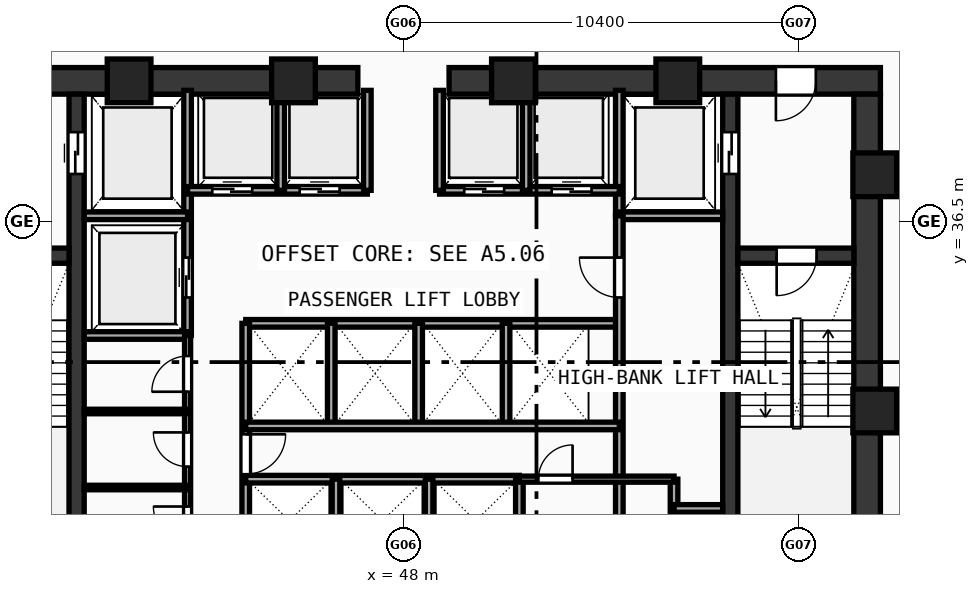
"""IFC4 building model, lengths in metres.
Left out: names, types, materials, properties, quantities, classifications, styles, units other than length and angle.
Written with IfcOpenShell. Run it as: python <this file> out.ifc"""

import sys

from ifc_helpers import new_model, si_unit, direction, frame, frame_2d, origin, origin_with_axes, origin_2d, place, context, subcontext, project, spatial, rectangle, hollow_rectangle, extrude, source, transform, mapped, element, fill, save


model = new_model("IFC4")
c1 = context("Model", 3, precision=1e-05, world=origin(), true_north=direction((0.0, 1.0)))
c2 = subcontext(c1, "Body", "Model", "MODEL_VIEW")
j1 = project(units=[si_unit("LENGTHUNIT", "METRE"), si_unit("PLANEANGLEUNIT", "RADIAN")], contexts=[c1])
p1 = place(None, origin())
s1 = spatial("IfcSite", under=j1, at=p1, CompositionType="ELEMENT")
p2 = place(p1, origin())
s2 = spatial("IfcBuilding", under=s1, at=p2, CompositionType="ELEMENT")
p3 = place(p2, frame((0.0, 0.0, 55.81)))
s3 = spatial("IfcBuildingStorey", under=s2, at=p3, CompositionType="ELEMENT", Elevation=55.81)
p4 = place(p3, frame((35.45, 40.2, 0.0), z_axis=(0.0, 0.0, 1.0), x_axis=(1.0, 0.0, 0.0)))
e1 = element("IfcWall", 1, at=p4, inside=s3, PredefinedType="SHEAR", context=c2, shape_type="SweptSolid", body=[
    extrude(rectangle(XDim=11.35, YDim=0.7, at=frame_2d((5.675, 0.0))), origin(), (0.0, 0.0, 1.0), 3.37),
])
p5 = place(p4, frame((1.7, 0.0, 0.0)))
e2 = element("IfcOpeningElement", 2, at=p5, cuts=e1, PredefinedType="OPENING", context=c2, shape_type="SweptSolid", body=[
    extrude(rectangle(XDim=1.05, YDim=2.1, at=frame_2d((0.525, 1.05))), frame((0.0, 0.36, 0.0), z_axis=(0.0, -1.0, 0.0), x_axis=(1.0, 0.0, 0.0)), (0.0, 0.0, 1.0), 0.72),
])
p6 = place(p3, frame((49.2, 40.2, 0.0), z_axis=(0.0, 0.0, 1.0), x_axis=(1.0, 0.0, 0.0)))
e3 = element("IfcWall", 3, at=p6, inside=s3, PredefinedType="SHEAR", context=c2, shape_type="SweptSolid", body=[
    extrude(rectangle(XDim=11.35, YDim=0.7, at=frame_2d((5.675, 0.0))), origin(), (0.0, 0.0, 1.0), 3.37),
])
p7 = place(p6, frame((8.6, 0.0, 0.0)))
e4 = element("IfcOpeningElement", 4, at=p7, cuts=e3, PredefinedType="OPENING", context=c2, shape_type="SweptSolid", body=[
    extrude(rectangle(XDim=1.05, YDim=2.1, at=frame_2d((0.525, 1.05))), frame((0.0, 0.36, 0.0), z_axis=(0.0, -1.0, 0.0), x_axis=(1.0, 0.0, 0.0)), (0.0, 0.0, 1.0), 0.72),
])
p8 = place(p3, frame((60.2, 27.85, 0.0), z_axis=(0.0, 0.0, 1.0), x_axis=(0.0, 1.0, 0.0)))
e5 = element("IfcWall", 5, at=p8, inside=s3, PredefinedType="SHEAR", context=c2, shape_type="SweptSolid", body=[
    extrude(rectangle(XDim=12.0, YDim=0.7, at=frame_2d((6.0, 0.0))), origin(), (0.0, 0.0, 1.0), 3.37),
])
p9 = place(p3, frame((39.4, 27.85, 0.0), z_axis=(0.0, 0.0, 1.0), x_axis=(0.0, 1.0, 0.0)))
e6 = element("IfcWall", 6, at=p9, inside=s3, PredefinedType="SHEAR", context=c2, shape_type="SweptSolid", body=[
    extrude(rectangle(XDim=12.0, YDim=0.4, at=frame_2d((6.0, 0.0))), origin(), (0.0, 0.0, 1.0), 3.37),
])
p10 = place(p9, frame((9.9, 0.0, 0.0)))
e7 = element("IfcOpeningElement", 7, at=p10, cuts=e6, PredefinedType="OPENING", context=c2, shape_type="SweptSolid", body=[
    extrude(rectangle(XDim=1.1, YDim=2.1, at=frame_2d((0.55, 1.05))), frame((0.0, 0.21, 0.0), z_axis=(0.0, -1.0, 0.0), x_axis=(1.0, 0.0, 0.0)), (0.0, 0.0, 1.0), 0.42),
])
p11 = place(p3, frame((56.6, 27.85, 0.0), z_axis=(0.0, 0.0, 1.0), x_axis=(0.0, 1.0, 0.0)))
e8 = element("IfcWall", 8, at=p11, inside=s3, PredefinedType="SHEAR", context=c2, shape_type="SweptSolid", body=[
    extrude(rectangle(XDim=12.0, YDim=0.4, at=frame_2d((6.0, 0.0))), origin(), (0.0, 0.0, 1.0), 3.37),
])
p12 = place(p11, frame((9.9, 0.0, 0.0)))
e9 = element("IfcOpeningElement", 9, at=p12, cuts=e8, PredefinedType="OPENING", context=c2, shape_type="SweptSolid", body=[
    extrude(rectangle(XDim=1.1, YDim=2.1, at=frame_2d((0.55, 1.05))), frame((0.0, 0.21, 0.0), z_axis=(0.0, -1.0, 0.0), x_axis=(1.0, 0.0, 0.0)), (0.0, 0.0, 1.0), 0.42),
])
p13 = place(p3, frame((36.15, 35.6, 0.0), z_axis=(0.0, 0.0, 1.0), x_axis=(1.0, 0.0, 0.0)))
e10 = element("IfcWall", 10, at=p13, inside=s3, PredefinedType="SHEAR", context=c2, shape_type="SweptSolid", body=[
    extrude(rectangle(XDim=3.05, YDim=0.4, at=frame_2d((1.525, 0.0))), origin(), (0.0, 0.0, 1.0), 3.37),
])
p14 = place(p13, frame((0.97, 0.0, 0.0)))
e11 = element("IfcOpeningElement", 11, at=p14, cuts=e10, PredefinedType="OPENING", context=c2, shape_type="SweptSolid", body=[
    extrude(rectangle(XDim=1.05, YDim=2.1, at=frame_2d((0.525, 1.05))), frame((0.0, 0.21, 0.0), z_axis=(0.0, -1.0, 0.0), x_axis=(1.0, 0.0, 0.0)), (0.0, 0.0, 1.0), 0.42),
])
p15 = place(p3, frame((56.8, 35.6, 0.0), z_axis=(0.0, 0.0, 1.0), x_axis=(1.0, 0.0, 0.0)))
e12 = element("IfcWall", 12, at=p15, inside=s3, PredefinedType="SHEAR", context=c2, shape_type="SweptSolid", body=[
    extrude(rectangle(XDim=3.05, YDim=0.4, at=frame_2d((1.525, 0.0))), origin(), (0.0, 0.0, 1.0), 3.37),
])
p16 = place(p15, frame((1.02, 0.0, 0.0)))
e13 = element("IfcOpeningElement", 13, at=p16, cuts=e12, PredefinedType="OPENING", context=c2, shape_type="SweptSolid", body=[
    extrude(rectangle(XDim=1.05, YDim=2.1, at=frame_2d((0.525, 1.05))), frame((0.0, 0.21, 0.0), z_axis=(0.0, -1.0, 0.0), x_axis=(1.0, 0.0, 0.0)), (0.0, 0.0, 1.0), 0.42),
])
m1 = source(origin(), c2, "Body", "SweptSolid", [
    extrude(hollow_rectangle(XDim=1.15, YDim=1.15, WallThickness=0.048, at=origin_2d()), origin(), (0.0, 0.0, 1.0), 3.63),
])
for number, where, z_axis, x_axis in (
    (14, (60.4, 31.513, -0.26), (0.0, 0.0, 1.0), (1.0, 0.0, 0.0)),
    (15, (60.4, 37.729, -0.26), (0.0, 0.0, 1.0), (1.0, 0.0, 0.0)),
    (16, (55.219, 40.2, -0.26), (0.0, 0.0, 1.0), (1.0, 0.0, 0.0)),
    (17, (50.894, 40.2, -0.26), (0.0, 0.0, 1.0), (1.0, 0.0, 0.0)),
    (18, (45.106, 40.2, -0.26), (0.0, 0.0, 1.0), (1.0, 0.0, 0.0)),
    (19, (40.781, 40.2, -0.26), (0.0, 0.0, 1.0), (1.0, 0.0, 0.0)),
):
    element("IfcColumn", number, at=place(p3, frame(where, z_axis=z_axis, x_axis=x_axis)), inside=s3, PredefinedType="COLUMN", context=c2, shape_type="MappedRepresentation", body=[
        mapped(m1, transform((0.0, 0.0, 0.0), scale=1.0)),
    ])
p17 = place(p3, frame((42.32, 33.5, 0.0), z_axis=(0.0, 0.0, 1.0), x_axis=(0.0, 1.0, 0.0)))
e20 = element("IfcWall", 20, at=p17, inside=s3, PredefinedType="SOLIDWALL", context=c2, shape_type="SweptSolid", body=[
    extrude(rectangle(XDim=6.45, YDim=0.2, at=frame_2d((3.225, 0.0))), origin(), (0.0, 0.0, 1.0), 3.37),
])
p18 = place(p17, frame((1.0, 0.0, 0.0)))
e21 = element("IfcOpeningElement", 21, at=p18, cuts=e20, PredefinedType="OPENING", context=c2, shape_type="SweptSolid", body=[
    extrude(rectangle(XDim=1.05, YDim=2.1, at=frame_2d((0.525, 1.05))), frame((0.0, 0.11, 0.0), z_axis=(0.0, -1.0, 0.0), x_axis=(1.0, 0.0, 0.0)), (0.0, 0.0, 1.0), 0.22),
])
for number, where, z_axis, x_axis in (
    (22, (39.6, 36.65, 0.0), (0.0, 0.0, 1.0), (1.0, 0.0, 0.0)),
    (23, (39.6, 33.5, 0.0), (0.0, 0.0, 1.0), (1.0, 0.0, 0.0)),
):
    element("IfcWall", number, at=place(p3, frame(where, z_axis=z_axis, x_axis=x_axis)), inside=s3, PredefinedType="SOLIDWALL", context=c2, shape_type="SweptSolid", body=[
        extrude(rectangle(XDim=2.72, YDim=0.2, at=frame_2d((1.36, 0.0))), origin(), (0.0, 0.0, 1.0), 3.37),
    ])
p19 = place(p3, frame((53.68, 36.65, 0.0), z_axis=(0.0, 0.0, 1.0), x_axis=(0.0, 1.0, 0.0)))
e24 = element("IfcWall", 24, at=p19, inside=s3, PredefinedType="SOLIDWALL", context=c2, shape_type="SweptSolid", body=[
    extrude(rectangle(XDim=3.3, YDim=0.2, at=frame_2d((1.65, 0.0))), origin(), (0.0, 0.0, 1.0), 3.37),
])
p20 = place(p3, frame((53.68, 36.65, 0.0), z_axis=(0.0, 0.0, 1.0), x_axis=(1.0, 0.0, 0.0)))
e25 = element("IfcWall", 25, at=p20, inside=s3, PredefinedType="SOLIDWALL", context=c2, shape_type="SweptSolid", body=[
    extrude(rectangle(XDim=2.72, YDim=0.2, at=frame_2d((1.36, 0.0))), origin(), (0.0, 0.0, 1.0), 3.37),
])
p21 = place(p3, frame((42.32, 37.32, 0.0), z_axis=(0.0, 0.0, 1.0), x_axis=(1.0, 0.0, 0.0)))
e26 = element("IfcWall", 26, at=p21, inside=s3, PredefinedType="SOLIDWALL", context=c2, shape_type="SweptSolid", body=[
    extrude(rectangle(XDim=4.73, YDim=0.2, at=frame_2d((2.365, 0.0))), origin(), (0.0, 0.0, 1.0), 3.37),
])
p22 = place(p21, frame((0.65, 0.0, 0.0)))
e27 = element("IfcOpeningElement", 27, at=p22, cuts=e26, PredefinedType="OPENING", context=c2, shape_type="SweptSolid", body=[
    extrude(rectangle(XDim=1.05, YDim=2.1, at=frame_2d((0.525, 1.05))), frame((0.0, 0.11, 0.0), z_axis=(0.0, -1.0, 0.0), x_axis=(1.0, 0.0, 0.0)), (0.0, 0.0, 1.0), 0.22),
])
p23 = place(p21, frame((2.95, 0.0, 0.0)))
e28 = element("IfcOpeningElement", 28, at=p23, cuts=e26, PredefinedType="OPENING", context=c2, shape_type="SweptSolid", body=[
    extrude(rectangle(XDim=1.05, YDim=2.1, at=frame_2d((0.525, 1.05))), frame((0.0, 0.11, 0.0), z_axis=(0.0, -1.0, 0.0), x_axis=(1.0, 0.0, 0.0)), (0.0, 0.0, 1.0), 0.22),
])
p24 = place(p3, frame((48.95, 37.32, 0.0), z_axis=(0.0, 0.0, 1.0), x_axis=(1.0, 0.0, 0.0)))
e29 = element("IfcWall", 29, at=p24, inside=s3, PredefinedType="SOLIDWALL", context=c2, shape_type="SweptSolid", body=[
    extrude(rectangle(XDim=4.73, YDim=0.2, at=frame_2d((2.365, 0.0))), origin(), (0.0, 0.0, 1.0), 3.37),
])
p25 = place(p24, frame((0.65, 0.0, 0.0)))
e30 = element("IfcOpeningElement", 30, at=p25, cuts=e29, PredefinedType="OPENING", context=c2, shape_type="SweptSolid", body=[
    extrude(rectangle(XDim=1.05, YDim=2.1, at=frame_2d((0.525, 1.05))), frame((0.0, 0.11, 0.0), z_axis=(0.0, -1.0, 0.0), x_axis=(1.0, 0.0, 0.0)), (0.0, 0.0, 1.0), 0.22),
])
p26 = place(p24, frame((2.95, 0.0, 0.0)))
e31 = element("IfcOpeningElement", 31, at=p26, cuts=e29, PredefinedType="OPENING", context=c2, shape_type="SweptSolid", body=[
    extrude(rectangle(XDim=1.05, YDim=2.1, at=frame_2d((0.525, 1.05))), frame((0.0, 0.11, 0.0), z_axis=(0.0, -1.0, 0.0), x_axis=(1.0, 0.0, 0.0)), (0.0, 0.0, 1.0), 0.22),
])
for number, where, z_axis, x_axis in (
    (32, (47.05, 37.32, 0.0), (0.0, 0.0, 1.0), (0.0, 1.0, 0.0)),
    (33, (48.95, 37.32, 0.0), (0.0, 0.0, 1.0), (0.0, 1.0, 0.0)),
    (34, (44.77, 37.32, 0.0), (0.0, 0.0, 1.0), (0.0, 1.0, 0.0)),
    (35, (51.23, 37.32, 0.0), (0.0, 0.0, 1.0), (0.0, 1.0, 0.0)),
):
    element("IfcWall", number, at=place(p3, frame(where, z_axis=z_axis, x_axis=x_axis)), inside=s3, PredefinedType="SOLIDWALL", context=c2, shape_type="SweptSolid", body=[
        extrude(rectangle(XDim=2.63, YDim=0.2, at=frame_2d((1.315, 0.0))), origin(), (0.0, 0.0, 1.0), 3.37),
    ])
p27 = place(p3, frame((43.85, 33.82, 0.0), z_axis=(0.0, 0.0, 1.0), x_axis=(1.0, 0.0, 0.0)))
e36 = element("IfcWall", 36, at=p27, inside=s3, PredefinedType="SOLIDWALL", context=c2, shape_type="SweptSolid", body=[
    extrude(rectangle(XDim=9.83, YDim=0.2, at=frame_2d((4.915, 0.0))), origin(), (0.0, 0.0, 1.0), 3.37),
])
p28 = place(p3, frame((43.85, 27.6, 0.0), z_axis=(0.0, 0.0, 1.0), x_axis=(0.0, 1.0, 0.0)))
e37 = element("IfcWall", 37, at=p28, inside=s3, PredefinedType="SOLIDWALL", context=c2, shape_type="SweptSolid", body=[
    extrude(rectangle(XDim=6.22, YDim=0.2, at=frame_2d((3.11, 0.0))), origin(), (0.0, 0.0, 1.0), 3.37),
])
p29 = place(p28, frame((2.25, 0.0, 0.0)))
e38 = element("IfcOpeningElement", 38, at=p29, cuts=e37, PredefinedType="OPENING", context=c2, shape_type="SweptSolid", body=[
    extrude(rectangle(XDim=1.05, YDim=2.1, at=frame_2d((0.525, 1.05))), frame((0.0, 0.11, 0.0), z_axis=(0.0, -1.0, 0.0), x_axis=(1.0, 0.0, 0.0)), (0.0, 0.0, 1.0), 0.22),
])
p30 = place(p3, frame((53.68, 27.6, 0.0), z_axis=(0.0, 0.0, 1.0), x_axis=(0.0, 1.0, 0.0)))
e39 = element("IfcWall", 39, at=p30, inside=s3, PredefinedType="SOLIDWALL", context=c2, shape_type="SweptSolid", body=[
    extrude(rectangle(XDim=9.05, YDim=0.2, at=frame_2d((4.525, 0.0))), origin(), (0.0, 0.0, 1.0), 3.37),
])
p31 = place(p30, frame((6.9, 0.0, 0.0)))
e40 = element("IfcOpeningElement", 40, at=p31, cuts=e39, PredefinedType="OPENING", context=c2, shape_type="SweptSolid", body=[
    extrude(rectangle(XDim=1.05, YDim=2.1, at=frame_2d((0.525, 1.05))), frame((0.0, 0.11, 0.0), z_axis=(0.0, -1.0, 0.0), x_axis=(1.0, 0.0, 0.0)), (0.0, 0.0, 1.0), 0.22),
])
for number, where, z_axis, x_axis in (
    (41, (46.1, 31.12, 0.0), (0.0, 0.0, 1.0), (0.0, 1.0, 0.0)),
    (42, (48.4, 31.12, 0.0), (0.0, 0.0, 1.0), (0.0, 1.0, 0.0)),
    (43, (50.7, 31.12, 0.0), (0.0, 0.0, 1.0), (0.0, 1.0, 0.0)),
):
    element("IfcWall", number, at=place(p3, frame(where, z_axis=z_axis, x_axis=x_axis)), inside=s3, PredefinedType="SOLIDWALL", context=c2, shape_type="SweptSolid", body=[
        extrude(rectangle(XDim=2.7, YDim=0.2, at=frame_2d((1.35, 0.0))), origin(), (0.0, 0.0, 1.0), 3.37),
    ])
p32 = place(p3, frame((43.85, 29.72, 0.0), z_axis=(0.0, 0.0, 1.0), x_axis=(1.0, 0.0, 0.0)))
e44 = element("IfcWall", 44, at=p32, inside=s3, PredefinedType="SOLIDWALL", context=c2, shape_type="SweptSolid", body=[
    extrude(rectangle(XDim=7.2, YDim=0.2, at=frame_2d((3.6, 0.0))), origin(), (0.0, 0.0, 1.0), 3.37),
])
p33 = place(p3, frame((51.05, 27.6, 0.0), z_axis=(0.0, 0.0, 1.0), x_axis=(0.0, 1.0, 0.0)))
e45 = element("IfcWall", 45, at=p33, inside=s3, PredefinedType="SOLIDWALL", context=c2, shape_type="SweptSolid", body=[
    extrude(rectangle(XDim=2.12, YDim=0.2, at=frame_2d((1.06, 0.0))), origin(), (0.0, 0.0, 1.0), 3.37),
])
p34 = place(p3, frame((43.85, 31.12, 0.0), z_axis=(0.0, 0.0, 1.0), x_axis=(1.0, 0.0, 0.0)))
e46 = element("IfcWall", 46, at=p34, inside=s3, PredefinedType="SOLIDWALL", context=c2, shape_type="SweptSolid", body=[
    extrude(rectangle(XDim=9.83, YDim=0.2, at=frame_2d((4.915, 0.0))), origin(), (0.0, 0.0, 1.0), 3.37),
])
for number, where, z_axis, x_axis in (
    (47, (46.225, 27.6, 0.0), (0.0, 0.0, 1.0), (0.0, 1.0, 0.0)),
    (48, (48.675, 27.6, 0.0), (0.0, 0.0, 1.0), (0.0, 1.0, 0.0)),
    (49, (55.12, 27.6, 0.0), (0.0, 0.0, 1.0), (0.0, 1.0, 0.0)),
):
    element("IfcWall", number, at=place(p3, frame(where, z_axis=z_axis, x_axis=x_axis)), inside=s3, PredefinedType="SOLIDWALL", context=c2, shape_type="SweptSolid", body=[
        extrude(rectangle(XDim=2.12, YDim=0.2, at=frame_2d((1.06, 0.0))), origin(), (0.0, 0.0, 1.0), 3.37),
    ])
p35 = place(p3, frame((55.12, 28.95, 0.0), z_axis=(0.0, 0.0, 1.0), x_axis=(1.0, 0.0, 0.0)))
e50 = element("IfcWall", 50, at=p35, inside=s3, PredefinedType="SOLIDWALL", context=c2, shape_type="SweptSolid", body=[
    extrude(rectangle(XDim=1.28, YDim=0.2, at=frame_2d((0.64, 0.0))), origin(), (0.0, 0.0, 1.0), 3.37),
])
p36 = place(p3, frame((42.32, 27.6, 0.0), z_axis=(0.0, 0.0, 1.0), x_axis=(0.0, 1.0, 0.0)))
e51 = element("IfcWall", 51, at=p36, inside=s3, PredefinedType="PARTITIONING", context=c2, shape_type="SweptSolid", body=[
    extrude(rectangle(XDim=5.9, YDim=0.16, at=frame_2d((2.95, 0.0))), origin(), (0.0, 0.0, 1.0), 3.37),
])
p37 = place(p36, frame((0.5, 0.0, 0.0)))
e52 = element("IfcOpeningElement", 52, at=p37, cuts=e51, PredefinedType="OPENING", context=c2, shape_type="SweptSolid", body=[
    extrude(rectangle(XDim=0.9, YDim=2.1, at=frame_2d((0.45, 1.05))), frame((0.0, 0.09, 0.0), z_axis=(0.0, -1.0, 0.0), x_axis=(1.0, 0.0, 0.0)), (0.0, 0.0, 1.0), 0.18),
])
p38 = place(p36, frame((2.45, 0.0, 0.0)))
e53 = element("IfcOpeningElement", 53, at=p38, cuts=e51, PredefinedType="OPENING", context=c2, shape_type="SweptSolid", body=[
    extrude(rectangle(XDim=0.9, YDim=2.1, at=frame_2d((0.45, 1.05))), frame((0.0, 0.09, 0.0), z_axis=(0.0, -1.0, 0.0), x_axis=(1.0, 0.0, 0.0)), (0.0, 0.0, 1.0), 0.18),
])
p39 = place(p36, frame((4.42, 0.0, 0.0)))
e54 = element("IfcOpeningElement", 54, at=p39, cuts=e51, PredefinedType="OPENING", context=c2, shape_type="SweptSolid", body=[
    extrude(rectangle(XDim=0.94, YDim=2.1, at=frame_2d((0.47, 1.05))), frame((0.0, 0.09, 0.0), z_axis=(0.0, -1.0, 0.0), x_axis=(1.0, 0.0, 0.0)), (0.0, 0.0, 1.0), 0.18),
])
p40 = place(p3, frame((51.05, 29.72, 0.0), z_axis=(0.0, 0.0, 1.0), x_axis=(1.0, 0.0, 0.0)))
e55 = element("IfcWall", 55, at=p40, inside=s3, PredefinedType="PARTITIONING", context=c2, shape_type="SweptSolid", body=[
    extrude(rectangle(XDim=4.07, YDim=0.16, at=frame_2d((2.035, 0.0))), origin(), (0.0, 0.0, 1.0), 3.37),
])
p41 = place(p40, frame((0.5, 0.0, 0.0)))
e56 = element("IfcOpeningElement", 56, at=p41, cuts=e55, PredefinedType="OPENING", context=c2, shape_type="SweptSolid", body=[
    extrude(rectangle(XDim=0.9, YDim=2.1, at=frame_2d((0.45, 1.05))), frame((0.0, 0.09, 0.0), z_axis=(0.0, -1.0, 0.0), x_axis=(1.0, 0.0, 0.0)), (0.0, 0.0, 1.0), 0.18),
])
for number, where, z_axis, x_axis in (
    (57, (39.6, 29.5, 0.0), (0.0, 0.0, 1.0), (1.0, 0.0, 0.0)),
    (58, (39.6, 31.5, 0.0), (0.0, 0.0, 1.0), (1.0, 0.0, 0.0)),
):
    element("IfcWall", number, at=place(p3, frame(where, z_axis=z_axis, x_axis=x_axis)), inside=s3, PredefinedType="PARTITIONING", context=c2, shape_type="SweptSolid", body=[
        extrude(rectangle(XDim=2.72, YDim=0.12, at=frame_2d((1.36, 0.0))), origin(), (0.0, 0.0, 1.0), 3.37),
    ])
m2 = source(origin(), c2, "Body", "SweptSolid", [
    extrude(rectangle(XDim=1.05, YDim=2.1, at=frame_2d((0.525, 1.05))), frame((0.0, 0.025, 0.0), z_axis=(0.0, -1.0, 0.0), x_axis=(1.0, 0.0, 0.0)), (0.0, 0.0, 1.0), 0.05),
])
p42 = place(p16, frame((1.05, 0.0, 0.0), z_axis=(0.0, 0.0, 1.0), x_axis=(-1.0, 0.0, 0.0)))
e59 = element("IfcDoor", 59, at=p42, inside=s3, OperationType="SINGLE_SWING_RIGHT", PredefinedType="DOOR", context=c2, shape_type="MappedRepresentation", body=[
    mapped(m2, transform((0.0, 0.0, 0.0), scale=1.0)),
])
fill(e13, e59)
p43 = place(p7, frame((1.05, 0.0, 0.0), z_axis=(0.0, 0.0, 1.0), x_axis=(-1.0, 0.0, 0.0)))
e60 = element("IfcDoor", 60, at=p43, inside=s3, OperationType="SINGLE_SWING_RIGHT", PredefinedType="DOOR", context=c2, shape_type="MappedRepresentation", body=[
    mapped(m2, transform((0.0, 0.0, 0.0), scale=1.0)),
])
fill(e4, e60)
m3 = source(origin(), c2, "Body", "SweptSolid", [
    extrude(rectangle(XDim=1.1, YDim=2.1, at=frame_2d((0.55, 1.05))), frame((0.0, 0.025, 0.0), z_axis=(0.0, -1.0, 0.0), x_axis=(1.0, 0.0, 0.0)), (0.0, 0.0, 1.0), 0.05),
])
p44 = place(p10, frame((1.1, 0.0, 0.0), z_axis=(0.0, 0.0, 1.0), x_axis=(-1.0, 0.0, 0.0)))
e61 = element("IfcDoor", 61, at=p44, inside=s3, OperationType="DOUBLE_DOOR_SLIDING", PredefinedType="DOOR", context=c2, shape_type="MappedRepresentation", body=[
    mapped(m3, transform((0.0, 0.0, 0.0), scale=1.0)),
])
fill(e7, e61)
p45 = place(p12, origin_with_axes())
e62 = element("IfcDoor", 62, at=p45, inside=s3, OperationType="DOUBLE_DOOR_SLIDING", PredefinedType="DOOR", context=c2, shape_type="MappedRepresentation", body=[
    mapped(m3, transform((0.0, 0.0, 0.0), scale=1.0)),
])
fill(e9, e62)
p46 = place(p18, origin_with_axes())
e63 = element("IfcDoor", 63, at=p46, inside=s3, OperationType="DOUBLE_DOOR_SLIDING", PredefinedType="DOOR", context=c2, shape_type="MappedRepresentation", body=[
    mapped(m2, transform((0.0, 0.0, 0.0), scale=1.0)),
])
fill(e21, e63)
p47 = place(p22, frame((1.05, 0.0, 0.0), z_axis=(0.0, 0.0, 1.0), x_axis=(-1.0, 0.0, 0.0)))
e64 = element("IfcDoor", 64, at=p47, inside=s3, OperationType="DOUBLE_DOOR_SLIDING", PredefinedType="DOOR", context=c2, shape_type="MappedRepresentation", body=[
    mapped(m2, transform((0.0, 0.0, 0.0), scale=1.0)),
])
fill(e27, e64)
p48 = place(p23, frame((1.05, 0.0, 0.0), z_axis=(0.0, 0.0, 1.0), x_axis=(-1.0, 0.0, 0.0)))
e65 = element("IfcDoor", 65, at=p48, inside=s3, OperationType="DOUBLE_DOOR_SLIDING", PredefinedType="DOOR", context=c2, shape_type="MappedRepresentation", body=[
    mapped(m2, transform((0.0, 0.0, 0.0), scale=1.0)),
])
fill(e28, e65)
p49 = place(p25, frame((1.05, 0.0, 0.0), z_axis=(0.0, 0.0, 1.0), x_axis=(-1.0, 0.0, 0.0)))
e66 = element("IfcDoor", 66, at=p49, inside=s3, OperationType="DOUBLE_DOOR_SLIDING", PredefinedType="DOOR", context=c2, shape_type="MappedRepresentation", body=[
    mapped(m2, transform((0.0, 0.0, 0.0), scale=1.0)),
])
fill(e30, e66)
p50 = place(p26, frame((1.05, 0.0, 0.0), z_axis=(0.0, 0.0, 1.0), x_axis=(-1.0, 0.0, 0.0)))
e67 = element("IfcDoor", 67, at=p50, inside=s3, OperationType="DOUBLE_DOOR_SLIDING", PredefinedType="DOOR", context=c2, shape_type="MappedRepresentation", body=[
    mapped(m2, transform((0.0, 0.0, 0.0), scale=1.0)),
])
fill(e31, e67)
p51 = place(p29, frame((1.05, 0.0, 0.0), z_axis=(0.0, 0.0, 1.0), x_axis=(-1.0, 0.0, 0.0)))
e68 = element("IfcDoor", 68, at=p51, inside=s3, OperationType="SINGLE_SWING_LEFT", PredefinedType="DOOR", context=c2, shape_type="MappedRepresentation", body=[
    mapped(m2, transform((0.0, 0.0, 0.0), scale=1.0)),
])
fill(e38, e68)
p52 = place(p31, origin_with_axes())
e69 = element("IfcDoor", 69, at=p52, inside=s3, OperationType="SINGLE_SWING_RIGHT", PredefinedType="DOOR", context=c2, shape_type="MappedRepresentation", body=[
    mapped(m2, transform((0.0, 0.0, 0.0), scale=1.0)),
])
fill(e40, e69)
m4 = source(origin(), c2, "Body", "SweptSolid", [
    extrude(rectangle(XDim=0.9, YDim=2.1, at=frame_2d((0.45, 1.05))), frame((0.0, 0.025, 0.0), z_axis=(0.0, -1.0, 0.0), x_axis=(1.0, 0.0, 0.0)), (0.0, 0.0, 1.0), 0.05),
])
p53 = place(p37, origin_with_axes())
e70 = element("IfcDoor", 70, at=p53, inside=s3, OperationType="SINGLE_SWING_RIGHT", PredefinedType="DOOR", context=c2, shape_type="MappedRepresentation", body=[
    mapped(m4, transform((0.0, 0.0, 0.0), scale=1.0)),
])
fill(e52, e70)
p54 = place(p38, origin_with_axes())
e71 = element("IfcDoor", 71, at=p54, inside=s3, OperationType="SINGLE_SWING_RIGHT", PredefinedType="DOOR", context=c2, shape_type="MappedRepresentation", body=[
    mapped(m4, transform((0.0, 0.0, 0.0), scale=1.0)),
])
fill(e53, e71)
m5 = source(origin(), c2, "Body", "SweptSolid", [
    extrude(rectangle(XDim=0.94, YDim=2.1, at=frame_2d((0.47, 1.05))), frame((0.0, 0.025, 0.0), z_axis=(0.0, -1.0, 0.0), x_axis=(1.0, 0.0, 0.0)), (0.0, 0.0, 1.0), 0.05),
])
p55 = place(p39, origin_with_axes())
e72 = element("IfcDoor", 72, at=p55, inside=s3, OperationType="SINGLE_SWING_LEFT", PredefinedType="DOOR", context=c2, shape_type="MappedRepresentation", body=[
    mapped(m5, transform((0.0, 0.0, 0.0), scale=1.0)),
])
fill(e54, e72)
p56 = place(p41, origin_with_axes())
e73 = element("IfcDoor", 73, at=p56, inside=s3, OperationType="SINGLE_SWING_RIGHT", PredefinedType="DOOR", context=c2, shape_type="MappedRepresentation", body=[
    mapped(m4, transform((0.0, 0.0, 0.0), scale=1.0)),
])
fill(e56, e73)
save(model, sys.argv[1])
